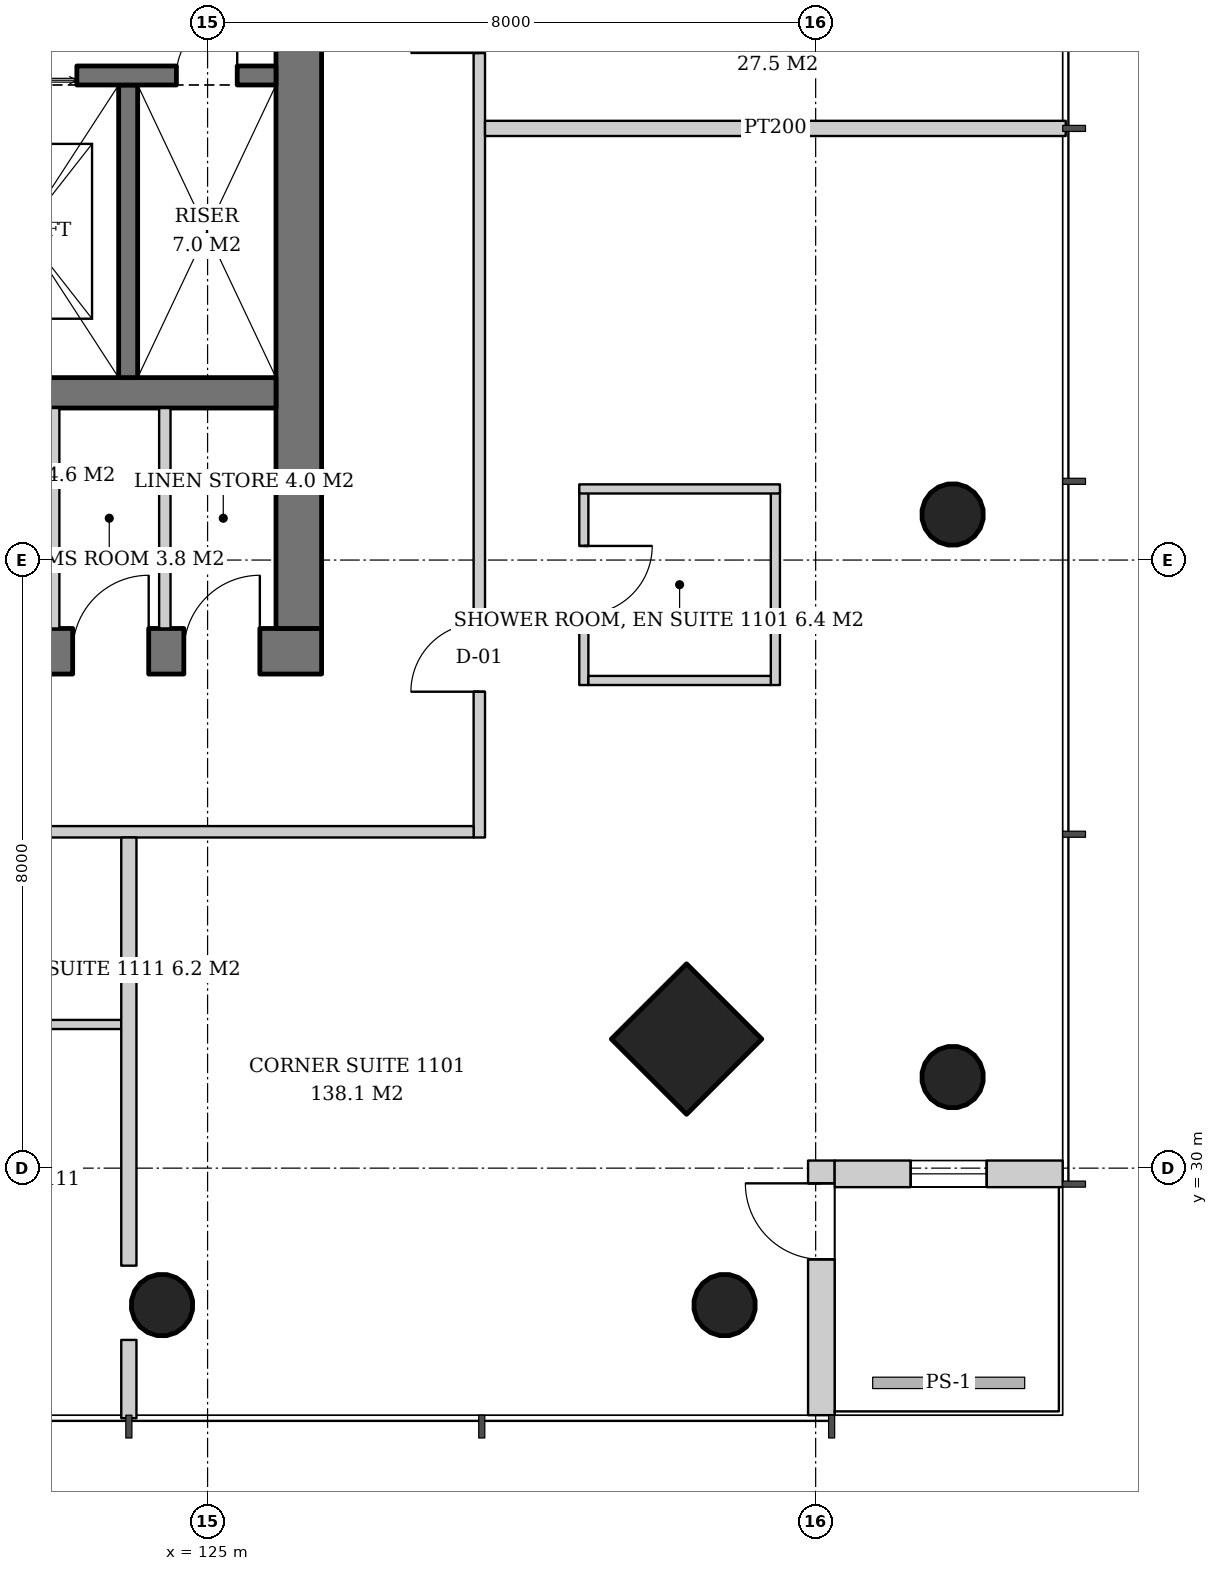
"""IFC4 building model, lengths in metres.
Left out: names, types, materials, properties, quantities, classifications, styles, units other than length and angle.
Written with IfcOpenShell. Run it as: python <this file> out.ifc"""

import sys

from ifc_helpers import new_model, si_unit, direction, frame, frame_2d, origin, origin_2d, place, context, subcontext, project, spatial, rectangle, hollow_circle, extrude, element, fill, save


model = new_model("IFC4")
c1 = context("Model", 3, precision=1e-05, world=origin(), true_north=direction((0.0, 1.0)))
c2 = subcontext(c1, "Body", "Model", "MODEL_VIEW")
j1 = project(units=[si_unit("LENGTHUNIT", "METRE"), si_unit("PLANEANGLEUNIT", "RADIAN")], contexts=[c1])
p1 = place(None, origin())
s1 = spatial("IfcSite", under=j1, at=p1, CompositionType="ELEMENT")
p2 = place(p1, origin())
s2 = spatial("IfcBuilding", under=s1, at=p2, CompositionType="ELEMENT")
p3 = place(p2, frame((0.0, 0.0, 47.6)))
s3 = spatial("IfcBuildingStorey", under=s2, at=p3, CompositionType="ELEMENT", Elevation=47.6)
p4 = place(p3, frame((134.854, 31.146, 0.0), z_axis=(-0.043032401563, 0.043032401563, 0.998146494675), x_axis=(-0.707106781187, -0.707106781187, 0.0)))
e1 = element("IfcColumn", 1, at=p4, inside=s3, PredefinedType="COLUMN", context=c2, shape_type="SweptSolid", body=[
    extrude(hollow_circle(Radius=0.406, WallThickness=0.03, at=origin_2d()), origin(), (0.0, 0.0, 1.0), 3.807),
])
p5 = place(p3, frame((134.854, 38.573, 0.0), z_axis=(-0.043062285527, 0.021563230905, 0.998839660125), x_axis=(-0.44774654769, -0.894160516368, 0.0)))
e2 = element("IfcColumn", 2, at=p5, inside=s3, PredefinedType="COLUMN", context=c2, shape_type="SweptSolid", body=[
    extrude(hollow_circle(Radius=0.406, WallThickness=0.03, at=origin_2d()), origin(), (0.0, 0.0, 1.0), 3.804),
])
p6 = place(p3, frame((131.354, 31.646, 0.0), z_axis=(-0.043032401563, 0.043032401563, 0.998146494675), x_axis=(-0.707106781187, -0.707106781187, 0.0)))
e3 = element("IfcColumn", 3, at=p6, inside=s3, PredefinedType="COLUMN", context=c2, shape_type="SweptSolid", body=[
    extrude(rectangle(XDim=1.4, YDim=1.4, at=origin_2d()), origin(), (0.0, 0.0, 1.0), 3.807),
])
p7 = place(p3, frame((131.854, 28.146, 0.0), z_axis=(-0.043032401563, 0.043032401563, 0.998146494675), x_axis=(-0.707106781187, -0.707106781187, 0.0)))
e4 = element("IfcColumn", 4, at=p7, inside=s3, PredefinedType="COLUMN", context=c2, shape_type="SweptSolid", body=[
    extrude(hollow_circle(Radius=0.406, WallThickness=0.03, at=origin_2d()), origin(), (0.0, 0.0, 1.0), 3.807),
])
p8 = place(p3, frame((124.427, 28.146, 0.0), z_axis=(-0.021563230905, 0.043062285527, 0.998839660125), x_axis=(-0.894160516368, -0.44774654769, 0.0)))
e5 = element("IfcColumn", 5, at=p8, inside=s3, PredefinedType="COLUMN", context=c2, shape_type="SweptSolid", body=[
    extrude(hollow_circle(Radius=0.406, WallThickness=0.03, at=origin_2d()), origin(), (0.0, 0.0, 1.0), 3.804),
])
p9 = place(p3, frame((107.5, 36.8, 0.0), z_axis=(0.0, 0.0, 1.0), x_axis=(1.0, 0.0, 0.0)))
e6 = element("IfcWall", 6, at=p9, inside=s3, PredefinedType="SHEAR", context=c2, shape_type="SweptSolid", body=[
    extrude(rectangle(XDim=19.0, YDim=0.6, at=frame_2d((9.5, 0.0))), origin(), (0.0, 0.0, 1.0), 3.8),
])
p10 = place(p9, frame((3.9, 0.0, 0.0)))
e7 = element("IfcOpeningElement", 7, at=p10, cuts=e6, PredefinedType="OPENING", context=c2, shape_type="SweptSolid", body=[
    extrude(rectangle(XDim=1.0, YDim=2.1, at=frame_2d((0.5, 1.05))), frame((0.0, 0.31, 0.0), z_axis=(0.0, -1.0, 0.0), x_axis=(1.0, 0.0, 0.0)), (0.0, 0.0, 1.0), 0.62),
])
p11 = place(p9, frame((14.153, 0.0, 0.0)))
e8 = element("IfcOpeningElement", 8, at=p11, cuts=e6, PredefinedType="OPENING", context=c2, shape_type="SweptSolid", body=[
    extrude(rectangle(XDim=1.0, YDim=2.1, at=frame_2d((0.5, 1.05))), frame((0.0, 0.31, 0.0), z_axis=(0.0, -1.0, 0.0), x_axis=(1.0, 0.0, 0.0)), (0.0, 0.0, 1.0), 0.62),
])
p12 = place(p9, frame((15.725, 0.0, 0.0)))
e9 = element("IfcOpeningElement", 9, at=p12, cuts=e6, PredefinedType="OPENING", context=c2, shape_type="SweptSolid", body=[
    extrude(rectangle(XDim=1.0, YDim=2.1, at=frame_2d((0.5, 1.05))), frame((0.0, 0.31, 0.0), z_axis=(0.0, -1.0, 0.0), x_axis=(1.0, 0.0, 0.0)), (0.0, 0.0, 1.0), 0.62),
])
p13 = place(p9, frame((17.188, 0.0, 0.0)))
e10 = element("IfcOpeningElement", 10, at=p13, cuts=e6, PredefinedType="OPENING", context=c2, shape_type="SweptSolid", body=[
    extrude(rectangle(XDim=1.0, YDim=2.1, at=frame_2d((0.5, 1.05))), frame((0.0, 0.31, 0.0), z_axis=(0.0, -1.0, 0.0), x_axis=(1.0, 0.0, 0.0)), (0.0, 0.0, 1.0), 0.62),
])
p14 = place(p3, frame((126.2, 37.1, 0.0), z_axis=(0.0, 0.0, 1.0), x_axis=(0.0, 1.0, 0.0)))
e11 = element("IfcWall", 11, at=p14, inside=s3, PredefinedType="SHEAR", context=c2, shape_type="SweptSolid", body=[
    extrude(rectangle(XDim=17.8, YDim=0.6, at=frame_2d((8.9, 0.0))), origin(), (0.0, 0.0, 1.0), 3.8),
])
p15 = place(p14, frame((8.0, 0.0, 0.0)))
e12 = element("IfcOpeningElement", 12, at=p15, cuts=e11, PredefinedType="OPENING", context=c2, shape_type="SweptSolid", body=[
    extrude(rectangle(XDim=1.8, YDim=2.4, at=frame_2d((0.9, 1.2))), frame((0.0, 0.31, 0.0), z_axis=(0.0, -1.0, 0.0), x_axis=(1.0, 0.0, 0.0)), (0.0, 0.0, 1.0), 0.62),
])
p16 = place(p3, frame((108.1, 40.2, 0.0), z_axis=(0.0, 0.0, 1.0), x_axis=(1.0, 0.0, 0.0)))
e13 = element("IfcWall", 13, at=p16, inside=s3, PredefinedType="SHEAR", context=c2, shape_type="SweptSolid", body=[
    extrude(rectangle(XDim=17.8, YDim=0.4, at=frame_2d((8.9, 0.0))), origin(), (0.0, 0.0, 1.0), 3.8),
])
p17 = place(p3, frame((133.075, 26.75, 0.0), z_axis=(0.0, 0.0, 1.0), x_axis=(0.0, 1.0, 0.0)))
e14 = element("IfcWall", 14, at=p17, inside=s3, PredefinedType="SOLIDWALL", context=c2, shape_type="SweptSolid", body=[
    extrude(rectangle(XDim=3.35, YDim=0.35, at=frame_2d((1.675, 0.0))), origin(), (0.0, 0.0, 1.0), 3.6),
])
p18 = place(p17, frame((2.05, 0.0, 0.0)))
e15 = element("IfcOpeningElement", 15, at=p18, cuts=e14, PredefinedType="OPENING", context=c2, shape_type="SweptSolid", body=[
    extrude(rectangle(XDim=1.0, YDim=2.4, at=frame_2d((0.5, 1.2))), frame((0.0, 0.185, 0.0), z_axis=(0.0, -1.0, 0.0), x_axis=(1.0, 0.0, 0.0)), (0.0, 0.0, 1.0), 0.37),
])
p19 = place(p3, frame((133.25, 29.925, 0.0), z_axis=(0.0, 0.0, 1.0), x_axis=(1.0, 0.0, 0.0)))
e16 = element("IfcWall", 16, at=p19, inside=s3, PredefinedType="SOLIDWALL", context=c2, shape_type="SweptSolid", body=[
    extrude(rectangle(XDim=3.0, YDim=0.35, at=frame_2d((1.5, 0.0))), origin(), (0.0, 0.0, 1.0), 3.6),
])
p20 = place(p19, frame((1.0, 0.0, 0.9)))
e17 = element("IfcOpeningElement", 17, at=p20, cuts=e16, PredefinedType="OPENING", context=c2, shape_type="SweptSolid", body=[
    extrude(rectangle(XDim=1.0, YDim=2.4, at=frame_2d((0.5, 1.2))), frame((0.0, 0.185, 0.0), z_axis=(0.0, -1.0, 0.0), x_axis=(1.0, 0.0, 0.0)), (0.0, 0.0, 1.0), 0.37),
])
p21 = place(p3, frame((123.955, 44.25, 0.0), z_axis=(0.0, 0.0, 1.0), x_axis=(0.0, -1.0, 0.0)))
e18 = element("IfcWall", 18, at=p21, inside=s3, PredefinedType="SHEAR", context=c2, shape_type="SweptSolid", body=[
    extrude(rectangle(XDim=3.85, YDim=0.25, at=frame_2d((1.925, 0.0))), origin(), (0.0, 0.0, 1.0), 3.8),
])
p22 = place(p3, frame((121.33, 44.375, 0.0), z_axis=(0.0, 0.0, 1.0), x_axis=(1.0, 0.0, 0.0)))
e19 = element("IfcWall", 19, at=p22, inside=s3, PredefinedType="SHEAR", context=c2, shape_type="SweptSolid", body=[
    extrude(rectangle(XDim=4.57, YDim=0.25, at=frame_2d((2.285, 0.0))), origin(), (0.0, 0.0, 1.0), 3.8),
])
p23 = place(p22, frame((0.55, 0.0, 0.0)))
e20 = element("IfcOpeningElement", 20, at=p23, cuts=e19, PredefinedType="OPENING", context=c2, shape_type="SweptSolid", body=[
    extrude(rectangle(XDim=1.4, YDim=2.4, at=frame_2d((0.7, 1.2))), frame((0.0, 0.135, 0.0), z_axis=(0.0, -1.0, 0.0), x_axis=(1.0, 0.0, 0.0)), (0.0, 0.0, 1.0), 0.27),
])
p24 = place(p22, frame((3.26, 0.0, 0.0)))
e21 = element("IfcOpeningElement", 21, at=p24, cuts=e19, PredefinedType="OPENING", context=c2, shape_type="SweptSolid", body=[
    extrude(rectangle(XDim=0.8, YDim=2.0, at=frame_2d((0.4, 1.0))), frame((0.0, 0.135, 0.0), z_axis=(0.0, -1.0, 0.0), x_axis=(1.0, 0.0, 0.0)), (0.0, 0.0, 1.0), 0.27),
])
for number, where, z_axis, x_axis in (
    (22, (122.975, 37.1, 0.0), (0.0, 0.0, 1.0), (0.0, 1.0, 0.0)),
    (23, (124.438, 37.1, 0.0), (0.0, 0.0, 1.0), (0.0, 1.0, 0.0)),
):
    element("IfcWall", number, at=place(p3, frame(where, z_axis=z_axis, x_axis=x_axis)), inside=s3, PredefinedType="SOLIDWALL", context=c2, shape_type="SweptSolid", body=[
        extrude(rectangle(XDim=2.9, YDim=0.15, at=frame_2d((1.45, 0.0))), origin(), (0.0, 0.0, 1.0), 3.6),
    ])
p25 = place(p3, frame((129.95, 38.936, 0.0), z_axis=(0.0, 0.0, 1.0), x_axis=(0.0, -1.0, 0.0)))
e24 = element("IfcWall", 24, at=p25, inside=s3, PredefinedType="PARTITIONING", context=c2, shape_type="SweptSolid", body=[
    extrude(rectangle(XDim=2.58, YDim=0.12, at=frame_2d((1.29, 0.0))), origin(), (0.0, 0.0, 1.0), 2.8),
])
p26 = place(p25, frame((0.75, 0.0, 0.0)))
e25 = element("IfcOpeningElement", 25, at=p26, cuts=e24, PredefinedType="OPENING", context=c2, shape_type="SweptSolid", body=[
    extrude(rectangle(XDim=0.9, YDim=2.1, at=frame_2d((0.45, 1.05))), frame((0.0, 0.07, 0.0), z_axis=(0.0, -1.0, 0.0), x_axis=(1.0, 0.0, 0.0)), (0.0, 0.0, 1.0), 0.14),
])
p27 = place(p3, frame((132.47, 38.936, 0.0), z_axis=(0.0, 0.0, 1.0), x_axis=(0.0, -1.0, 0.0)))
e26 = element("IfcWall", 26, at=p27, inside=s3, PredefinedType="PARTITIONING", context=c2, shape_type="SweptSolid", body=[
    extrude(rectangle(XDim=2.58, YDim=0.12, at=frame_2d((1.29, 0.0))), origin(), (0.0, 0.0, 1.0), 2.8),
])
p28 = place(p3, frame((130.01, 36.416, 0.0), z_axis=(0.0, 0.0, 1.0), x_axis=(1.0, 0.0, 0.0)))
e27 = element("IfcWall", 27, at=p28, inside=s3, PredefinedType="PARTITIONING", context=c2, shape_type="SweptSolid", body=[
    extrude(rectangle(XDim=2.4, YDim=0.12, at=frame_2d((1.2, 0.0))), origin(), (0.0, 0.0, 1.0), 2.847),
])
p29 = place(p3, frame((129.89, 38.936, 0.0), z_axis=(0.0, 0.0, 1.0), x_axis=(1.0, 0.0, 0.0)))
e28 = element("IfcWall", 28, at=p29, inside=s3, PredefinedType="PARTITIONING", context=c2, shape_type="SweptSolid", body=[
    extrude(rectangle(XDim=2.64, YDim=0.12, at=frame_2d((1.32, 0.0))), origin(), (0.0, 0.0, 1.0), 3.6),
])
p30 = place(p3, frame((128.575, 34.35, 0.0), z_axis=(0.0, 0.0, 1.0), x_axis=(0.0, 1.0, 0.0)))
e29 = element("IfcWall", 29, at=p30, inside=s3, PredefinedType="PARTITIONING", context=c2, shape_type="SweptSolid", body=[
    extrude(rectangle(XDim=23.15, YDim=0.15, at=frame_2d((11.575, 0.0))), origin(), (0.0, 0.0, 1.0), 2.8),
])
p31 = place(p30, frame((1.918, 0.0, 0.0)))
e30 = element("IfcOpeningElement", 30, at=p31, cuts=e29, PredefinedType="OPENING", context=c2, shape_type="SweptSolid", body=[
    extrude(rectangle(XDim=0.9, YDim=2.1, at=frame_2d((0.45, 1.05))), frame((0.0, 0.085, 0.0), z_axis=(0.0, -1.0, 0.0), x_axis=(1.0, 0.0, 0.0)), (0.0, 0.0, 1.0), 0.17),
])
p32 = place(p30, frame((10.322, 0.0, 0.0)))
e31 = element("IfcOpeningElement", 31, at=p32, cuts=e29, PredefinedType="OPENING", context=c2, shape_type="SweptSolid", body=[
    extrude(rectangle(XDim=0.9, YDim=2.1, at=frame_2d((0.45, 1.05))), frame((0.0, 0.085, 0.0), z_axis=(0.0, -1.0, 0.0), x_axis=(1.0, 0.0, 0.0)), (0.0, 0.0, 1.0), 0.17),
])
p33 = place(p30, frame((16.721, 0.0, 0.0)))
e32 = element("IfcOpeningElement", 32, at=p33, cuts=e29, PredefinedType="OPENING", context=c2, shape_type="SweptSolid", body=[
    extrude(rectangle(XDim=0.9, YDim=2.1, at=frame_2d((0.45, 1.05))), frame((0.0, 0.085, 0.0), z_axis=(0.0, -1.0, 0.0), x_axis=(1.0, 0.0, 0.0)), (0.0, 0.0, 1.0), 0.17),
])
p34 = place(p3, frame((128.65, 43.678, 0.0), z_axis=(0.0, 0.0, 1.0), x_axis=(1.0, 0.0, 0.0)))
e33 = element("IfcWall", 33, at=p34, inside=s3, PredefinedType="PARTITIONING", context=c2, shape_type="SweptSolid", body=[
    extrude(rectangle(XDim=7.64, YDim=0.2, at=frame_2d((3.82, 0.0))), origin(), (0.0, 0.0, 1.0), 3.05),
])
p35 = place(p3, frame((121.444, 31.89, 0.0), z_axis=(0.0, 0.0, 1.0), x_axis=(1.0, 0.0, 0.0)))
e34 = element("IfcWall", 34, at=p35, inside=s3, PredefinedType="PARTITIONING", context=c2, shape_type="SweptSolid", body=[
    extrude(rectangle(XDim=2.42, YDim=0.12, at=frame_2d((1.21, 0.0))), origin(), (0.0, 0.0, 1.0), 3.6),
])
p36 = place(p3, frame((105.35, 34.425, 0.0), z_axis=(0.0, 0.0, 1.0), x_axis=(1.0, 0.0, 0.0)))
e35 = element("IfcWall", 35, at=p36, inside=s3, PredefinedType="PARTITIONING", context=c2, shape_type="SweptSolid", body=[
    extrude(rectangle(XDim=23.15, YDim=0.15, at=frame_2d((11.575, 0.0))), origin(), (0.0, 0.0, 1.0), 2.8),
])
p37 = place(p36, frame((1.918, 0.0, 0.0)))
e36 = element("IfcOpeningElement", 36, at=p37, cuts=e35, PredefinedType="OPENING", context=c2, shape_type="SweptSolid", body=[
    extrude(rectangle(XDim=0.9, YDim=2.1, at=frame_2d((0.45, 1.05))), frame((0.0, 0.085, 0.0), z_axis=(0.0, -1.0, 0.0), x_axis=(1.0, 0.0, 0.0)), (0.0, 0.0, 1.0), 0.17),
])
p38 = place(p36, frame((7.436, 0.0, 0.0)))
e37 = element("IfcOpeningElement", 37, at=p38, cuts=e35, PredefinedType="OPENING", context=c2, shape_type="SweptSolid", body=[
    extrude(rectangle(XDim=0.9, YDim=2.1, at=frame_2d((0.45, 1.05))), frame((0.0, 0.085, 0.0), z_axis=(0.0, -1.0, 0.0), x_axis=(1.0, 0.0, 0.0)), (0.0, 0.0, 1.0), 0.17),
])
p39 = place(p36, frame((14.964, 0.0, 0.0)))
e38 = element("IfcOpeningElement", 38, at=p39, cuts=e35, PredefinedType="OPENING", context=c2, shape_type="SweptSolid", body=[
    extrude(rectangle(XDim=0.9, YDim=2.1, at=frame_2d((0.45, 1.05))), frame((0.0, 0.085, 0.0), z_axis=(0.0, -1.0, 0.0), x_axis=(1.0, 0.0, 0.0)), (0.0, 0.0, 1.0), 0.17),
])
p40 = place(p3, frame((123.964, 34.35, 0.0), z_axis=(0.0, 0.0, 1.0), x_axis=(0.0, -1.0, 0.0)))
e39 = element("IfcWall", 39, at=p40, inside=s3, PredefinedType="PARTITIONING", context=c2, shape_type="SweptSolid", body=[
    extrude(rectangle(XDim=5.633, YDim=0.2, at=frame_2d((2.817, 0.0))), origin(), (0.0, 0.0, 1.0), 3.6),
])
p41 = place(p3, frame((123.964, 27.74, 0.0), z_axis=(0.0, 0.0, 1.0), x_axis=(0.0, -1.0, 0.0)))
e40 = element("IfcWall", 40, at=p41, inside=s3, PredefinedType="PARTITIONING", context=c2, shape_type="SweptSolid", body=[
    extrude(rectangle(XDim=1.03, YDim=0.2, at=frame_2d((0.515, 0.0))), origin(), (0.0, 0.0, 1.0), 3.6),
])
p42 = place(p18, origin())
e41 = element("IfcDoor", 41, at=p42, inside=s3, OperationType="SINGLE_SWING_RIGHT", PredefinedType="DOOR", context=c2, shape_type="SweptSolid", body=[
    extrude(rectangle(XDim=1.0, YDim=2.4, at=frame_2d((0.5, 1.2))), frame((0.0, 0.025, 0.0), z_axis=(0.0, -1.0, 0.0), x_axis=(1.0, 0.0, 0.0)), (0.0, 0.0, 1.0), 0.05),
])
fill(e15, e41)
p43 = place(p20, origin())
e42 = element("IfcWindow", 42, at=p43, inside=s3, PartitioningType="SINGLE_PANEL", PredefinedType="WINDOW", context=c2, shape_type="SweptSolid", body=[
    extrude(rectangle(XDim=1.0, YDim=2.4, at=frame_2d((0.5, 1.2))), frame((0.0, 0.03, 0.0), z_axis=(0.0, -1.0, 0.0), x_axis=(1.0, 0.0, 0.0)), (0.0, 0.0, 1.0), 0.06),
])
fill(e17, e42)
p44 = place(p23, origin())
e43 = element("IfcDoor", 43, at=p44, inside=s3, OperationType="DOUBLE_DOOR_SLIDING", PredefinedType="DOOR", context=c2, shape_type="SweptSolid", body=[
    extrude(rectangle(XDim=1.4, YDim=2.4, at=frame_2d((0.7, 1.2))), frame((0.0, 0.025, 0.0), z_axis=(0.0, -1.0, 0.0), x_axis=(1.0, 0.0, 0.0)), (0.0, 0.0, 1.0), 0.05),
])
fill(e20, e43)
p45 = place(p24, origin())
e44 = element("IfcDoor", 44, at=p45, inside=s3, OperationType="SINGLE_SWING_RIGHT", PredefinedType="DOOR", context=c2, shape_type="SweptSolid", body=[
    extrude(rectangle(XDim=0.8, YDim=2.0, at=frame_2d((0.4, 1.0))), frame((0.0, 0.025, 0.0), z_axis=(0.0, -1.0, 0.0), x_axis=(1.0, 0.0, 0.0)), (0.0, 0.0, 1.0), 0.05),
])
fill(e21, e44)
p46 = place(p12, origin())
e45 = element("IfcDoor", 45, at=p46, inside=s3, OperationType="SINGLE_SWING_RIGHT", PredefinedType="DOOR", context=c2, shape_type="SweptSolid", body=[
    extrude(rectangle(XDim=1.0, YDim=2.1, at=frame_2d((0.5, 1.05))), frame((0.0, 0.29, 0.0), z_axis=(0.0, -1.0, 0.0), x_axis=(1.0, 0.0, 0.0)), (0.0, 0.0, 1.0), 0.05),
])
fill(e9, e45)
p47 = place(p13, origin())
e46 = element("IfcDoor", 46, at=p47, inside=s3, OperationType="SINGLE_SWING_RIGHT", PredefinedType="DOOR", context=c2, shape_type="SweptSolid", body=[
    extrude(rectangle(XDim=1.0, YDim=2.1, at=frame_2d((0.5, 1.05))), frame((0.0, 0.29, 0.0), z_axis=(0.0, -1.0, 0.0), x_axis=(1.0, 0.0, 0.0)), (0.0, 0.0, 1.0), 0.05),
])
fill(e10, e46)
p48 = place(p26, origin())
e47 = element("IfcDoor", 47, at=p48, inside=s3, OperationType="SINGLE_SWING_LEFT", PredefinedType="DOOR", context=c2, shape_type="SweptSolid", body=[
    extrude(rectangle(XDim=0.9, YDim=2.1, at=frame_2d((0.45, 1.05))), frame((0.0, 0.025, 0.0), z_axis=(0.0, -1.0, 0.0), x_axis=(1.0, 0.0, 0.0)), (0.0, 0.0, 1.0), 0.05),
])
fill(e25, e47)
p49 = place(p31, origin())
e48 = element("IfcDoor", 48, at=p49, inside=s3, OperationType="SINGLE_SWING_LEFT", PredefinedType="DOOR", context=c2, shape_type="SweptSolid", body=[
    extrude(rectangle(XDim=0.9, YDim=2.1, at=frame_2d((0.45, 1.05))), frame((0.0, 0.025, 0.0), z_axis=(0.0, -1.0, 0.0), x_axis=(1.0, 0.0, 0.0)), (0.0, 0.0, 1.0), 0.05),
])
fill(e30, e48)
p50 = place(p32, origin())
e49 = element("IfcDoor", 49, at=p50, inside=s3, OperationType="SINGLE_SWING_LEFT", PredefinedType="DOOR", context=c2, shape_type="SweptSolid", body=[
    extrude(rectangle(XDim=0.9, YDim=2.1, at=frame_2d((0.45, 1.05))), frame((0.0, 0.025, 0.0), z_axis=(0.0, -1.0, 0.0), x_axis=(1.0, 0.0, 0.0)), (0.0, 0.0, 1.0), 0.05),
])
fill(e31, e49)
save(model, sys.argv[1])
